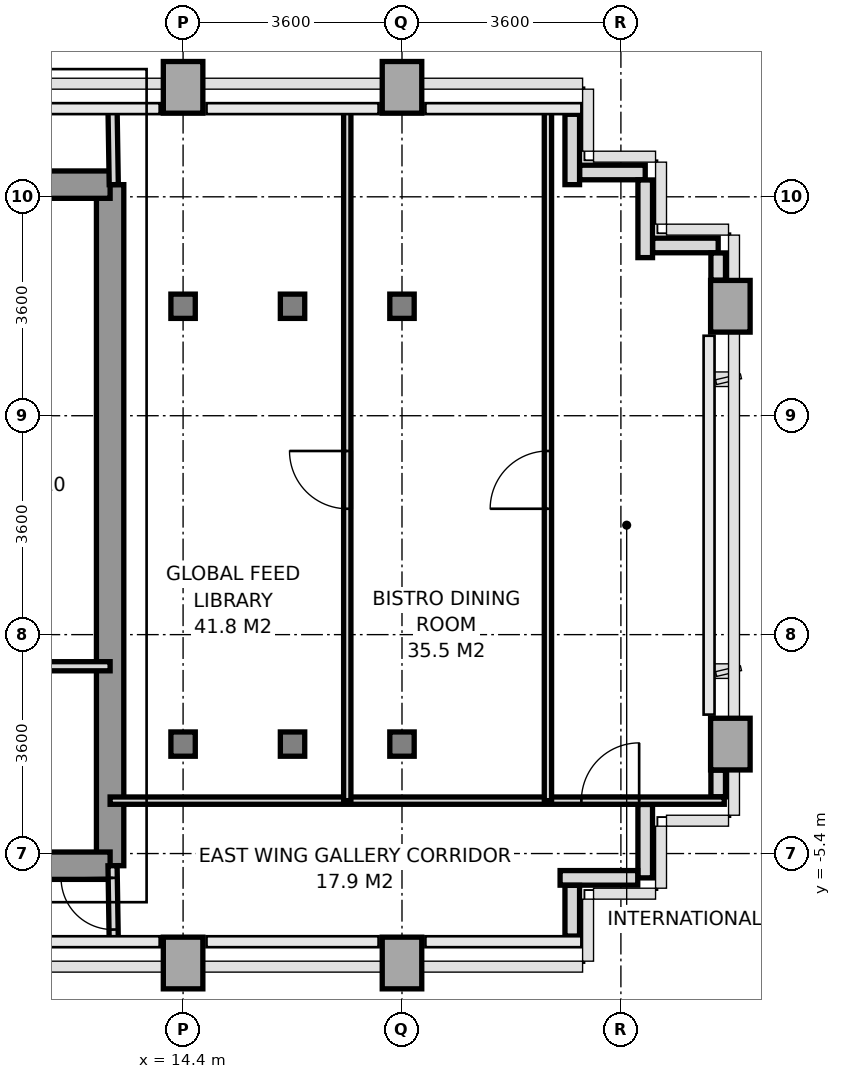
"""IFC4 building model, lengths in metres.
Left out: names, types, materials, properties, quantities, classifications, styles, units other than length and angle.
Written with IfcOpenShell. Run it as: python <this file> out.ifc"""

import sys

from ifc_helpers import new_model, si_unit, direction, frame, frame_2d, origin, origin_2d, place, context, subcontext, project, spatial, rectangle, i_section, extrude, source, transform, mapped, element, fill, save


model = new_model("IFC4")
c1 = context("Model", 3, precision=1e-05, world=origin(), true_north=direction((0.0, 1.0)))
c2 = subcontext(c1, "Body", "Model", "MODEL_VIEW")
j1 = project(units=[si_unit("LENGTHUNIT", "METRE"), si_unit("PLANEANGLEUNIT", "RADIAN")], contexts=[c1])
p1 = place(None, origin())
s1 = spatial("IfcSite", under=j1, at=p1, CompositionType="ELEMENT")
p2 = place(p1, origin())
s2 = spatial("IfcBuilding", under=s1, at=p2, CompositionType="ELEMENT")
p3 = place(p2, frame((0.0, 0.0, 121.0)))
s3 = spatial("IfcBuildingStorey", under=s2, at=p3, CompositionType="ELEMENT", Elevation=121.0)
m1 = source(origin(), c2, "Body", "SweptSolid", [
    extrude(rectangle(XDim=0.65, YDim=0.85, at=origin_2d()), origin(), (0.0, 0.0, 1.0), 3.2),
])
p4 = place(p3, frame((14.4, -7.2, 0.0), z_axis=(0.0, 0.0, 1.0), x_axis=(1.0, 0.0, 0.0)))
e1 = element("IfcColumn", 1, at=p4, inside=s3, PredefinedType="COLUMN", context=c2, shape_type="MappedRepresentation", body=[
    mapped(m1, transform((0.0, 0.0, 0.0), x_axis=(1.0, 0.0, 0.0), y_axis=(0.0, 1.0, 0.0), z_axis=(0.0, 0.0, 1.0), scale=1.0)),
])
m2 = source(origin(), c2, "Body", "SweptSolid", [
    extrude(i_section(OverallWidth=0.401, OverallDepth=0.399, WebThickness=0.02, FlangeThickness=0.032, at=origin_2d()), origin(), (0.0, 0.0, 1.0), 3.2),
])
for number, where, z_axis, x_axis in (
    (2, (14.4, -3.6, 0.0), (0.0, 0.0, 1.0), (1.0, 0.0, 0.0)),
    (3, (14.4, 3.6, 0.0), (0.0, 0.0, 1.0), (1.0, 0.0, 0.0)),
):
    element("IfcColumn", number, at=place(p3, frame(where, z_axis=z_axis, x_axis=x_axis)), inside=s3, PredefinedType="COLUMN", context=c2, shape_type="MappedRepresentation", body=[
        mapped(m2, transform((0.0, 0.0, 0.0), x_axis=(1.0, 0.0, 0.0), y_axis=(0.0, 1.0, 0.0), z_axis=(0.0, 0.0, 1.0), scale=1.0)),
    ])
p5 = place(p3, frame((14.4, 7.2, 0.0), z_axis=(0.0, 0.0, 1.0), x_axis=(1.0, 0.0, 0.0)))
e4 = element("IfcColumn", 4, at=p5, inside=s3, PredefinedType="COLUMN", context=c2, shape_type="MappedRepresentation", body=[
    mapped(m1, transform((0.0, 0.0, 0.0), x_axis=(1.0, 0.0, 0.0), y_axis=(0.0, 1.0, 0.0), z_axis=(0.0, 0.0, 1.0), scale=1.0)),
])
for number, where, z_axis, x_axis in (
    (5, (16.2, -3.6, 0.0), (0.0, 0.0, 1.0), (1.0, 0.0, 0.0)),
    (6, (16.2, 3.6, 0.0), (0.0, 0.0, 1.0), (1.0, 0.0, 0.0)),
):
    element("IfcColumn", number, at=place(p3, frame(where, z_axis=z_axis, x_axis=x_axis)), inside=s3, PredefinedType="COLUMN", context=c2, shape_type="MappedRepresentation", body=[
        mapped(m2, transform((0.0, 0.0, 0.0), x_axis=(1.0, 0.0, 0.0), y_axis=(0.0, 1.0, 0.0), z_axis=(0.0, 0.0, 1.0), scale=1.0)),
    ])
p6 = place(p3, frame((18.0, -7.2, 0.0), z_axis=(0.0, 0.0, 1.0), x_axis=(1.0, 0.0, 0.0)))
e7 = element("IfcColumn", 7, at=p6, inside=s3, PredefinedType="COLUMN", context=c2, shape_type="MappedRepresentation", body=[
    mapped(m1, transform((0.0, 0.0, 0.0), x_axis=(1.0, 0.0, 0.0), y_axis=(0.0, 1.0, 0.0), z_axis=(0.0, 0.0, 1.0), scale=1.0)),
])
for number, where, z_axis, x_axis in (
    (8, (18.0, -3.6, 0.0), (0.0, 0.0, 1.0), (1.0, 0.0, 0.0)),
    (9, (18.0, 3.6, 0.0), (0.0, 0.0, 1.0), (1.0, 0.0, 0.0)),
):
    element("IfcColumn", number, at=place(p3, frame(where, z_axis=z_axis, x_axis=x_axis)), inside=s3, PredefinedType="COLUMN", context=c2, shape_type="MappedRepresentation", body=[
        mapped(m2, transform((0.0, 0.0, 0.0), x_axis=(1.0, 0.0, 0.0), y_axis=(0.0, 1.0, 0.0), z_axis=(0.0, 0.0, 1.0), scale=1.0)),
    ])
for number, where, z_axis, x_axis in (
    (10, (18.0, 7.2, 0.0), (0.0, 0.0, 1.0), (1.0, 0.0, 0.0)),
    (11, (23.4, -3.6, 0.0), (0.0, 0.0, 1.0), (1.0, 0.0, 0.0)),
    (12, (23.4, 3.6, 0.0), (0.0, 0.0, 1.0), (1.0, 0.0, 0.0)),
):
    element("IfcColumn", number, at=place(p3, frame(where, z_axis=z_axis, x_axis=x_axis)), inside=s3, PredefinedType="COLUMN", context=c2, shape_type="MappedRepresentation", body=[
        mapped(m1, transform((0.0, 0.0, 0.0), x_axis=(1.0, 0.0, 0.0), y_axis=(0.0, 1.0, 0.0), z_axis=(0.0, 0.0, 1.0), scale=1.0)),
    ])
p7 = place(p3, frame((22.0, -4.593, 0.0), z_axis=(0.0, 0.0, 1.0), x_axis=(0.0, -1.0, 0.0)))
e13 = element("IfcWall", 13, at=p7, inside=s3, PredefinedType="PARAPET", context=c2, shape_type="SweptSolid", body=[
    extrude(rectangle(XDim=1.207, YDim=0.24, at=frame_2d((0.604, 0.0))), origin(), (0.0, 0.0, 1.0), 1.15),
])
p8 = place(p3, frame((21.877, -5.8, 0.0), z_axis=(0.0, 0.0, 1.0), x_axis=(-1.0, 0.0, 0.0)))
e14 = element("IfcWall", 14, at=p8, inside=s3, PredefinedType="PARAPET", context=c2, shape_type="SweptSolid", body=[
    extrude(rectangle(XDim=1.277, YDim=0.24, at=frame_2d((0.638, 0.0))), origin(), (0.0, 0.0, 1.0), 1.15),
])
p9 = place(p3, frame((20.8, -5.923, 0.0), z_axis=(0.0, 0.0, 1.0), x_axis=(0.0, -1.0, 0.0)))
e15 = element("IfcWall", 15, at=p9, inside=s3, PredefinedType="PARAPET", context=c2, shape_type="SweptSolid", body=[
    extrude(rectangle(XDim=0.834, YDim=0.24, at=frame_2d((0.417, 0.0))), origin(), (0.0, 0.0, 1.0), 1.15),
])
p10 = place(p3, frame((20.8, 6.757, 0.0), z_axis=(0.0, 0.0, 1.0), x_axis=(0.0, -1.0, 0.0)))
e16 = element("IfcWall", 16, at=p10, inside=s3, PredefinedType="PARAPET", context=c2, shape_type="SweptSolid", body=[
    extrude(rectangle(XDim=1.157, YDim=0.24, at=frame_2d((0.579, 0.0))), origin(), (0.0, 0.0, 1.0), 1.15),
])
p11 = place(p3, frame((20.923, 5.8, 0.0), z_axis=(0.0, 0.0, 1.0), x_axis=(1.0, 0.0, 0.0)))
e17 = element("IfcWall", 17, at=p11, inside=s3, PredefinedType="PARAPET", context=c2, shape_type="SweptSolid", body=[
    extrude(rectangle(XDim=1.077, YDim=0.24, at=frame_2d((0.539, 0.0))), origin(), (0.0, 0.0, 1.0), 1.15),
])
p12 = place(p3, frame((22.0, 5.677, 0.0), z_axis=(0.0, 0.0, 1.0), x_axis=(0.0, -1.0, 0.0)))
e18 = element("IfcWall", 18, at=p12, inside=s3, PredefinedType="PARAPET", context=c2, shape_type="SweptSolid", body=[
    extrude(rectangle(XDim=1.277, YDim=0.24, at=frame_2d((0.639, 0.0))), origin(), (0.0, 0.0, 1.0), 1.15),
])
p13 = place(p3, frame((22.123, 4.6, 0.0), z_axis=(0.0, 0.0, 1.0), x_axis=(1.0, 0.0, 0.0)))
e19 = element("IfcWall", 19, at=p13, inside=s3, PredefinedType="PARAPET", context=c2, shape_type="SweptSolid", body=[
    extrude(rectangle(XDim=1.077, YDim=0.24, at=frame_2d((0.539, 0.0))), origin(), (0.0, 0.0, 1.0), 1.15),
])
p14 = place(p3, frame((23.2, 4.477, 0.0), z_axis=(0.0, 0.0, 1.0), x_axis=(0.0, -1.0, 0.0)))
e20 = element("IfcWall", 20, at=p14, inside=s3, PredefinedType="PARAPET", context=c2, shape_type="SweptSolid", body=[
    extrude(rectangle(XDim=0.449, YDim=0.24, at=frame_2d((0.225, 0.0))), origin(), (0.0, 0.0, 1.0), 1.15),
])
p15 = place(p3, frame((23.2, -4.028, 0.0), z_axis=(0.0, 0.0, 1.0), x_axis=(0.0, -1.0, 0.0)))
e21 = element("IfcWall", 21, at=p15, inside=s3, PredefinedType="PARAPET", context=c2, shape_type="SweptSolid", body=[
    extrude(rectangle(XDim=0.439, YDim=0.24, at=frame_2d((0.219, 0.0))), origin(), (0.0, 0.0, 1.0), 1.15),
])
p16 = place(p3, frame((13.2, -5.6, 0.0), z_axis=(0.0, 0.0, 1.0), x_axis=(0.0, 1.0, 0.0)))
e22 = element("IfcWall", 22, at=p16, inside=s3, PredefinedType="SHEAR", context=c2, shape_type="SweptSolid", body=[
    extrude(rectangle(XDim=11.2, YDim=0.45, at=frame_2d((5.6, 0.0))), origin(), (0.0, 0.0, 1.0), 3.2),
])
p17 = place(p3, frame((11.381, 5.6, 0.0), z_axis=(0.0, 0.0, 1.0), x_axis=(1.0, 0.0, 0.0)))
e23 = element("IfcWall", 23, at=p17, inside=s3, PredefinedType="SHEAR", context=c2, shape_type="SweptSolid", body=[
    extrude(rectangle(XDim=1.819, YDim=0.45, at=frame_2d((0.909, 0.0))), origin(), (0.0, 0.0, 1.0), 3.2),
])
p18 = place(p3, frame((5.4, -5.6, 0.0), z_axis=(0.0, 0.0, 1.0), x_axis=(1.0, 0.0, 0.0)))
e24 = element("IfcWall", 24, at=p18, inside=s3, PredefinedType="SHEAR", context=c2, shape_type="SweptSolid", body=[
    extrude(rectangle(XDim=7.8, YDim=0.45, at=frame_2d((3.9, 0.0))), origin(), (0.0, 0.0, 1.0), 3.2),
])
p19 = place(p18, frame((3.0, 0.0, 0.0)))
e25 = element("IfcOpeningElement", 25, at=p19, cuts=e24, PredefinedType="OPENING", context=c2, shape_type="SweptSolid", body=[
    extrude(rectangle(XDim=1.2, YDim=2.2, at=frame_2d((0.6, 1.1))), frame((0.0, 0.235, 0.0), z_axis=(0.0, -1.0, 0.0), x_axis=(1.0, 0.0, 0.0)), (0.0, 0.0, 1.0), 0.47),
])
p20 = place(p18, frame((5.85, 0.0, 0.0)))
e26 = element("IfcOpeningElement", 26, at=p20, cuts=e24, PredefinedType="OPENING", context=c2, shape_type="SweptSolid", body=[
    extrude(rectangle(XDim=0.8, YDim=2.1, at=frame_2d((0.4, 1.05))), frame((0.0, 0.235, 0.0), z_axis=(0.0, -1.0, 0.0), x_axis=(1.0, 0.0, 0.0)), (0.0, 0.0, 1.0), 0.47),
])
p21 = place(p3, frame((11.02, -2.32, 0.0), z_axis=(0.0, 0.0, 1.0), x_axis=(1.0, 0.0, 0.0)))
e27 = element("IfcWall", 27, at=p21, inside=s3, PredefinedType="PARTITIONING", context=c2, shape_type="SweptSolid", body=[
    extrude(rectangle(XDim=2.18, YDim=0.15, at=frame_2d((1.09, 0.0))), origin(), (0.0, 0.0, 1.0), 3.2),
])
p22 = place(p3, frame((13.26, 5.6, 0.0), z_axis=(0.0, 0.0, 1.0), x_axis=(-0.016013571389, 0.999871774545, 0.0)))
e28 = element("IfcWall", 28, at=p22, inside=s3, PredefinedType="PARTITIONING", context=c2, shape_type="SweptSolid", body=[
    extrude(rectangle(XDim=1.25, YDim=0.15, at=frame_2d((0.625, 0.0))), origin(), (0.0, 0.0, 1.0), 3.2),
])
p23 = place(p3, frame((13.26, -6.85, 0.0), z_axis=(0.0, 0.0, 1.0), x_axis=(-0.016013571389, 0.999871774545, 0.0)))
e29 = element("IfcWall", 29, at=p23, inside=s3, PredefinedType="PARTITIONING", context=c2, shape_type="SweptSolid", body=[
    extrude(rectangle(XDim=1.25, YDim=0.15, at=frame_2d((0.625, 0.0))), origin(), (0.0, 0.0, 1.0), 3.2),
])
p24 = place(p23, frame((0.2, 0.0, 0.0)))
e30 = element("IfcOpeningElement", 30, at=p24, cuts=e29, PredefinedType="OPENING", context=c2, shape_type="SweptSolid", body=[
    extrude(rectangle(XDim=0.85, YDim=2.1, at=frame_2d((0.425, 1.05))), frame((0.0, 0.085, 0.0), z_axis=(0.0, -1.0, 0.0), x_axis=(1.0, 0.0, 0.0)), (0.0, 0.0, 1.0), 0.17),
])
p25 = place(p3, frame((13.2, -4.53, 0.0), z_axis=(0.0, 0.0, 1.0), x_axis=(1.0, 0.0, 0.0)))
e31 = element("IfcWall", 31, at=p25, inside=s3, PredefinedType="PARTITIONING", context=c2, shape_type="SweptSolid", body=[
    extrude(rectangle(XDim=10.1, YDim=0.12, at=frame_2d((5.05, 0.0))), origin(), (0.0, 0.0, 1.0), 2.75),
])
p26 = place(p25, frame((7.75, 0.0, 0.0)))
e32 = element("IfcOpeningElement", 32, at=p26, cuts=e31, PredefinedType="OPENING", context=c2, shape_type="SweptSolid", body=[
    extrude(rectangle(XDim=0.95, YDim=2.15, at=frame_2d((0.475, 1.075))), frame((0.0, 0.07, 0.0), z_axis=(0.0, -1.0, 0.0), x_axis=(1.0, 0.0, 0.0)), (0.0, 0.0, 1.0), 0.14),
])
p27 = place(p3, frame((17.1, -4.53, 0.0), z_axis=(0.0, 0.0, 1.0), x_axis=(0.0, 1.0, 0.0)))
e33 = element("IfcWall", 33, at=p27, inside=s3, PredefinedType="PARTITIONING", context=c2, shape_type="SweptSolid", body=[
    extrude(rectangle(XDim=11.38, YDim=0.12, at=frame_2d((5.69, 0.0))), origin(), (0.0, 0.0, 1.0), 2.7),
])
p28 = place(p27, frame((4.8, 0.0, 0.0)))
e34 = element("IfcOpeningElement", 34, at=p28, cuts=e33, PredefinedType="OPENING", context=c2, shape_type="SweptSolid", body=[
    extrude(rectangle(XDim=0.95, YDim=2.15, at=frame_2d((0.475, 1.075))), frame((0.0, 0.07, 0.0), z_axis=(0.0, -1.0, 0.0), x_axis=(1.0, 0.0, 0.0)), (0.0, 0.0, 1.0), 0.14),
])
p29 = place(p3, frame((20.4, -4.53, 0.0), z_axis=(0.0, 0.0, 1.0), x_axis=(0.0, 1.0, 0.0)))
e35 = element("IfcWall", 35, at=p29, inside=s3, PredefinedType="PARTITIONING", context=c2, shape_type="SweptSolid", body=[
    extrude(rectangle(XDim=11.38, YDim=0.12, at=frame_2d((5.69, 0.0))), origin(), (0.0, 0.0, 1.0), 2.7),
])
p30 = place(p29, frame((4.8, 0.0, 0.0)))
e36 = element("IfcOpeningElement", 36, at=p30, cuts=e35, PredefinedType="OPENING", context=c2, shape_type="SweptSolid", body=[
    extrude(rectangle(XDim=0.95, YDim=2.15, at=frame_2d((0.475, 1.075))), frame((0.0, 0.07, 0.0), z_axis=(0.0, -1.0, 0.0), x_axis=(1.0, 0.0, 0.0)), (0.0, 0.0, 1.0), 0.14),
])
m3 = source(origin(), c2, "Body", "SweptSolid", [
    extrude(rectangle(XDim=0.85, YDim=2.1, at=frame_2d((0.425, 1.05))), frame((0.0, 0.025, 0.0), z_axis=(0.0, -1.0, 0.0), x_axis=(1.0, 0.0, 0.0)), (0.0, 0.0, 1.0), 0.05),
])
p31 = place(p24, origin())
e37 = element("IfcDoor", 37, at=p31, inside=s3, OperationType="SINGLE_SWING_RIGHT", PredefinedType="DOOR", context=c2, shape_type="MappedRepresentation", body=[
    mapped(m3, transform((0.0, 0.0, 0.0), x_axis=(1.0, 0.0, 0.0), y_axis=(0.0, 1.0, 0.0), z_axis=(0.0, 0.0, 1.0), scale=1.0)),
])
fill(e30, e37)
m4 = source(origin(), c2, "Body", "SweptSolid", [
    extrude(rectangle(XDim=0.95, YDim=2.15, at=frame_2d((0.475, 1.075))), frame((0.0, 0.025, 0.0), z_axis=(0.0, -1.0, 0.0), x_axis=(1.0, 0.0, 0.0)), (0.0, 0.0, 1.0), 0.05),
])
p32 = place(p28, origin())
e38 = element("IfcDoor", 38, at=p32, inside=s3, OperationType="SINGLE_SWING_RIGHT", PredefinedType="DOOR", context=c2, shape_type="MappedRepresentation", body=[
    mapped(m4, transform((0.0, 0.0, 0.0), x_axis=(1.0, 0.0, 0.0), y_axis=(0.0, 1.0, 0.0), z_axis=(0.0, 0.0, 1.0), scale=1.0)),
])
fill(e34, e38)
p33 = place(p30, origin())
e39 = element("IfcDoor", 39, at=p33, inside=s3, OperationType="SINGLE_SWING_LEFT", PredefinedType="DOOR", context=c2, shape_type="MappedRepresentation", body=[
    mapped(m4, transform((0.0, 0.0, 0.0), x_axis=(1.0, 0.0, 0.0), y_axis=(0.0, 1.0, 0.0), z_axis=(0.0, 0.0, 1.0), scale=1.0)),
])
fill(e36, e39)
p34 = place(p26, origin())
e40 = element("IfcDoor", 40, at=p34, inside=s3, OperationType="SINGLE_SWING_RIGHT", PredefinedType="DOOR", context=c2, shape_type="MappedRepresentation", body=[
    mapped(m4, transform((0.0, 0.0, 0.0), x_axis=(1.0, 0.0, 0.0), y_axis=(0.0, 1.0, 0.0), z_axis=(0.0, 0.0, 1.0), scale=1.0)),
])
fill(e32, e40)
save(model, sys.argv[1])
